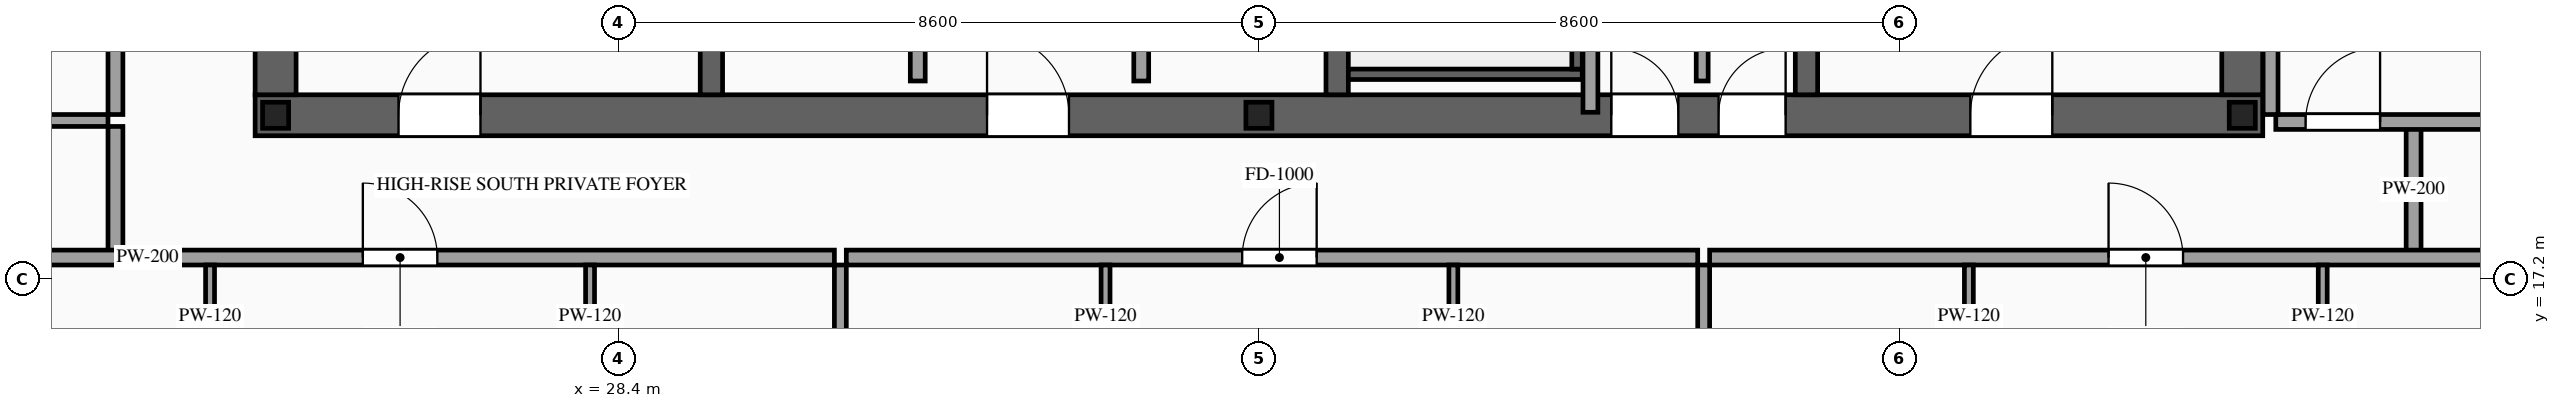
"""IFC4 building model, lengths in metres.
Left out: names, types, materials, properties, quantities, classifications, styles, units other than length and angle.
Written with IfcOpenShell. Run it as: python <this file> out.ifc"""

import sys

from ifc_helpers import new_model, si_unit, direction, frame, frame_2d, origin, origin_2d, place, context, subcontext, project, spatial, rectangle, i_section, extrude, source, transform, mapped, element, fill, save


model = new_model("IFC4")
c1 = context("Model", 3, precision=1e-05, world=origin(), true_north=direction((0.0, 1.0)))
c2 = subcontext(c1, "Body", "Model", "MODEL_VIEW")
j1 = project(units=[si_unit("LENGTHUNIT", "METRE"), si_unit("PLANEANGLEUNIT", "RADIAN")], contexts=[c1])
p1 = place(None, origin())
s1 = spatial("IfcSite", under=j1, at=p1, CompositionType="ELEMENT")
p2 = place(p1, origin())
s2 = spatial("IfcBuilding", under=s1, at=p2, CompositionType="ELEMENT")
p3 = place(p2, frame((0.0, 0.0, 268.1)))
s3 = spatial("IfcBuildingStorey", under=s2, at=p3, CompositionType="ELEMENT", Elevation=268.1)
p4 = place(p3, frame((23.525, 19.4, 0.0), z_axis=(0.0, 0.0, 1.0), x_axis=(1.0, 0.0, 0.0)))
e1 = element("IfcWall", 1, at=p4, inside=s3, PredefinedType="SHEAR", context=c2, shape_type="SweptSolid", body=[
    extrude(rectangle(XDim=26.95, YDim=0.55, at=frame_2d((13.475, 0.0))), origin(), (0.0, 0.0, 1.0), 3.5),
])
p5 = place(p4, frame((1.925, 0.0, 0.0)))
e2 = element("IfcOpeningElement", 2, at=p5, cuts=e1, PredefinedType="OPENING", context=c2, shape_type="SweptSolid", body=[
    extrude(rectangle(XDim=1.1, YDim=2.2, at=frame_2d((0.55, 1.1))), frame((0.0, 0.29, 0.0), z_axis=(0.0, -1.0, 0.0), x_axis=(1.0, 0.0, 0.0)), (0.0, 0.0, 1.0), 0.58),
])
p6 = place(p4, frame((9.825, 0.0, 0.0)))
e3 = element("IfcOpeningElement", 3, at=p6, cuts=e1, PredefinedType="OPENING", context=c2, shape_type="SweptSolid", body=[
    extrude(rectangle(XDim=1.1, YDim=2.2, at=frame_2d((0.55, 1.1))), frame((0.0, 0.29, 0.0), z_axis=(0.0, -1.0, 0.0), x_axis=(1.0, 0.0, 0.0)), (0.0, 0.0, 1.0), 0.58),
])
p7 = place(p4, frame((23.025, 0.0, 0.0)))
e4 = element("IfcOpeningElement", 4, at=p7, cuts=e1, PredefinedType="OPENING", context=c2, shape_type="SweptSolid", body=[
    extrude(rectangle(XDim=1.1, YDim=2.2, at=frame_2d((0.55, 1.1))), frame((0.0, 0.29, 0.0), z_axis=(0.0, -1.0, 0.0), x_axis=(1.0, 0.0, 0.0)), (0.0, 0.0, 1.0), 0.58),
])
p8 = place(p4, frame((19.645, 0.0, 0.0)))
e5 = element("IfcOpeningElement", 5, at=p8, cuts=e1, PredefinedType="OPENING", context=c2, shape_type="SweptSolid", body=[
    extrude(rectangle(XDim=0.9, YDim=2.15, at=frame_2d((0.45, 1.075))), frame((0.0, 0.29, 0.0), z_axis=(0.0, -1.0, 0.0), x_axis=(1.0, 0.0, 0.0)), (0.0, 0.0, 1.0), 0.58),
])
p9 = place(p4, frame((18.205, 0.0, 0.0)))
e6 = element("IfcOpeningElement", 6, at=p9, cuts=e1, PredefinedType="OPENING", context=c2, shape_type="SweptSolid", body=[
    extrude(rectangle(XDim=0.9, YDim=2.15, at=frame_2d((0.45, 1.075))), frame((0.0, 0.29, 0.0), z_axis=(0.0, -1.0, 0.0), x_axis=(1.0, 0.0, 0.0)), (0.0, 0.0, 1.0), 0.58),
])
m1 = source(origin(), c2, "Body", "SweptSolid", [
    extrude(rectangle(XDim=12.25, YDim=0.55, at=frame_2d((6.125, 0.0))), origin(), (0.0, 0.0, 1.0), 3.5),
])
for number, where, z_axis, x_axis in (
    (7, (23.8, 19.675, 0.0), (0.0, 0.0, 1.0), (0.0, 1.0, 0.0)),
    (8, (50.2, 19.675, 0.0), (0.0, 0.0, 1.0), (0.0, 1.0, 0.0)),
):
    element("IfcWall", number, at=place(p3, frame(where, z_axis=z_axis, x_axis=x_axis)), inside=s3, PredefinedType="SHEAR", context=c2, shape_type="MappedRepresentation", body=[
        mapped(m1, transform((0.0, 0.0, 0.0), scale=1.0)),
    ])
m2 = source(origin(), c2, "Body", "SweptSolid", [
    extrude(rectangle(XDim=12.25, YDim=0.3, at=frame_2d((6.125, 0.0))), origin(), (0.0, 0.0, 1.0), 3.5),
])
for number, where, z_axis, x_axis in (
    (9, (29.65, 19.675, 0.0), (0.0, 0.0, 1.0), (0.0, 1.0, 0.0)),
    (10, (38.05, 19.675, 0.0), (0.0, 0.0, 1.0), (0.0, 1.0, 0.0)),
):
    element("IfcWall", number, at=place(p3, frame(where, z_axis=z_axis, x_axis=x_axis)), inside=s3, PredefinedType="SOLIDWALL", context=c2, shape_type="MappedRepresentation", body=[
        mapped(m2, transform((0.0, 0.0, 0.0), scale=1.0)),
    ])
p10 = place(p3, frame((44.35, 19.675, 0.0), z_axis=(0.0, 0.0, 1.0), x_axis=(0.0, 1.0, 0.0)))
e11 = element("IfcWall", 11, at=p10, inside=s3, PredefinedType="SOLIDWALL", context=c2, shape_type="SweptSolid", body=[
    extrude(rectangle(XDim=12.25, YDim=0.3, at=frame_2d((6.125, 0.0))), origin(), (0.0, 0.0, 1.0), 3.5),
])
p11 = place(p10, frame((6.525, 0.0, 0.0)))
e12 = element("IfcOpeningElement", 12, at=p11, cuts=e11, PredefinedType="OPENING", context=c2, shape_type="SweptSolid", body=[
    extrude(rectangle(XDim=1.1, YDim=2.2, at=frame_2d((0.55, 1.1))), frame((0.0, 0.165, 0.0), z_axis=(0.0, -1.0, 0.0), x_axis=(1.0, 0.0, 0.0)), (0.0, 0.0, 1.0), 0.33),
])
p12 = place(p10, frame((8.625, 0.0, 0.0)))
e13 = element("IfcOpeningElement", 13, at=p12, cuts=e11, PredefinedType="OPENING", context=c2, shape_type="SweptSolid", body=[
    extrude(rectangle(XDim=1.1, YDim=2.2, at=frame_2d((0.55, 1.1))), frame((0.0, 0.165, 0.0), z_axis=(0.0, -1.0, 0.0), x_axis=(1.0, 0.0, 0.0)), (0.0, 0.0, 1.0), 0.33),
])
p13 = place(p10, frame((10.725, 0.0, 0.0)))
e14 = element("IfcOpeningElement", 14, at=p13, cuts=e11, PredefinedType="OPENING", context=c2, shape_type="SweptSolid", body=[
    extrude(rectangle(XDim=1.1, YDim=2.2, at=frame_2d((0.55, 1.1))), frame((0.0, 0.165, 0.0), z_axis=(0.0, -1.0, 0.0), x_axis=(1.0, 0.0, 0.0)), (0.0, 0.0, 1.0), 0.33),
])
m3 = source(origin(), c2, "Body", "SweptSolid", [
    extrude(i_section(OverallWidth=0.35, OverallDepth=0.35, WebThickness=0.012, FlangeThickness=0.019, at=origin_2d()), origin(), (0.0, 0.0, 1.0), 3.5),
])
for number, where, z_axis, x_axis in (
    (15, (23.8, 19.4, 0.0), (0.0, 0.0, 1.0), (1.0, 0.0, 0.0)),
    (16, (37.0, 19.4, 0.0), (0.0, 0.0, 1.0), (1.0, 0.0, 0.0)),
    (17, (50.2, 19.4, 0.0), (0.0, 0.0, 1.0), (1.0, 0.0, 0.0)),
):
    element("IfcColumn", number, at=place(p3, frame(where, z_axis=z_axis, x_axis=x_axis)), inside=s3, PredefinedType="COLUMN", context=c2, shape_type="MappedRepresentation", body=[
        mapped(m3, transform((0.0, 0.0, 0.0), scale=1.0)),
    ])
m4 = source(origin(), c2, "Body", "SweptSolid", [
    extrude(rectangle(XDim=3.14, YDim=0.14, at=frame_2d((1.57, 0.0))), origin(), (0.0, 0.0, 1.0), 3.28),
])
p14 = place(p3, frame((38.2, 19.95, 0.0), z_axis=(0.0, 0.0, 1.0), x_axis=(1.0, 0.0, 0.0)))
e18 = element("IfcWall", 18, at=p14, inside=s3, PredefinedType="SOLIDWALL", context=c2, shape_type="MappedRepresentation", body=[
    mapped(m4, transform((0.0, 0.0, 0.0), scale=1.0)),
])
m5 = source(origin(), c2, "Body", "SweptSolid", [
    extrude(rectangle(XDim=8.94, YDim=0.14, at=frame_2d((4.47, 0.0))), origin(), (0.0, 0.0, 1.0), 3.28),
])
p15 = place(p3, frame((41.27, 20.02, 0.0), z_axis=(0.0, 0.0, 1.0), x_axis=(0.0, 1.0, 0.0)))
e19 = element("IfcWall", 19, at=p15, inside=s3, PredefinedType="SOLIDWALL", context=c2, shape_type="MappedRepresentation", body=[
    mapped(m5, transform((0.0, 0.0, 0.0), scale=1.0)),
])
p16 = place(p3, frame((32.42, 19.86, 0.0), z_axis=(0.0, 0.0, 1.0), x_axis=(0.0, 1.0, 0.0)))
e20 = element("IfcWall", 20, at=p16, inside=s3, PredefinedType="PARTITIONING", context=c2, shape_type="SweptSolid", body=[
    extrude(rectangle(XDim=7.94, YDim=0.2, at=frame_2d((3.97, 0.0))), origin(), (0.0, 0.0, 1.0), 3.28),
])
p17 = place(p16, frame((3.52, 0.0, 0.0)))
e21 = element("IfcOpeningElement", 21, at=p17, cuts=e20, PredefinedType="OPENING", context=c2, shape_type="SweptSolid", body=[
    extrude(rectangle(XDim=0.9, YDim=2.15, at=frame_2d((0.45, 1.075))), frame((0.0, 0.115, 0.0), z_axis=(0.0, -1.0, 0.0), x_axis=(1.0, 0.0, 0.0)), (0.0, 0.0, 1.0), 0.23),
])
p18 = place(p3, frame((35.42, 19.86, 0.0), z_axis=(0.0, 0.0, 1.0), x_axis=(0.0, 1.0, 0.0)))
e22 = element("IfcWall", 22, at=p18, inside=s3, PredefinedType="PARTITIONING", context=c2, shape_type="SweptSolid", body=[
    extrude(rectangle(XDim=6.34, YDim=0.2, at=frame_2d((3.17, 0.0))), origin(), (0.0, 0.0, 1.0), 3.28),
])
p19 = place(p18, frame((2.72, 0.0, 0.0)))
e23 = element("IfcOpeningElement", 23, at=p19, cuts=e22, PredefinedType="OPENING", context=c2, shape_type="SweptSolid", body=[
    extrude(rectangle(XDim=0.9, YDim=2.15, at=frame_2d((0.45, 1.075))), frame((0.0, 0.115, 0.0), z_axis=(0.0, -1.0, 0.0), x_axis=(1.0, 0.0, 0.0)), (0.0, 0.0, 1.0), 0.23),
])
m6 = source(origin(), c2, "Body", "SweptSolid", [
    extrude(rectangle(XDim=1.34, YDim=0.16, at=frame_2d((0.67, 0.0))), origin(), (0.0, 0.0, 1.0), 3.28),
])
p20 = place(p3, frame((42.95, 19.86, 0.0), z_axis=(0.0, 0.0, 1.0), x_axis=(0.0, 1.0, 0.0)))
e24 = element("IfcWall", 24, at=p20, inside=s3, PredefinedType="PARTITIONING", context=c2, shape_type="MappedRepresentation", body=[
    mapped(m6, transform((0.0, 0.0, 0.0), scale=1.0)),
])
m7 = source(origin(), c2, "Body", "SweptSolid", [
    extrude(rectangle(XDim=6.06, YDim=0.2, at=frame_2d((3.03, 0.0))), origin(), (0.0, 0.0, 1.0), 3.28),
])
p21 = place(p3, frame((41.45, 19.44, 0.0), z_axis=(0.0, 0.0, 1.0), x_axis=(0.0, 1.0, 0.0)))
e25 = element("IfcWall", 25, at=p21, inside=s3, PredefinedType="PARTITIONING", context=c2, shape_type="MappedRepresentation", body=[
    mapped(m7, transform((0.0, 0.0, 0.0), scale=1.0)),
])
m8 = source(origin(), c2, "Body", "SweptSolid", [
    extrude(rectangle(XDim=1.7, YDim=0.2, at=frame_2d((0.85, 0.0))), origin(), (0.0, 0.0, 1.0), 3.28),
])
for number, where, z_axis, x_axis in (
    (26, (21.65, 17.55, 0.0), (0.0, 0.0, 1.0), (0.0, 1.0, 0.0)),
    (27, (52.5, 17.55, 0.0), (0.0, 0.0, 1.0), (0.0, 1.0, 0.0)),
):
    element("IfcWall", number, at=place(p3, frame(where, z_axis=z_axis, x_axis=x_axis)), inside=s3, PredefinedType="PARTITIONING", context=c2, shape_type="MappedRepresentation", body=[
        mapped(m8, transform((0.0, 0.0, 0.0), scale=1.0)),
    ])
p22 = place(p3, frame((19.44, 17.49, 0.0), z_axis=(0.0, 0.0, 1.0), x_axis=(1.0, 0.0, 0.0)))
e28 = element("IfcWall", 28, at=p22, inside=s3, PredefinedType="PARTITIONING", context=c2, shape_type="SweptSolid", body=[
    extrude(rectangle(XDim=11.861, YDim=0.2, at=frame_2d((5.931, 0.0))), origin(), (0.0, 0.0, 1.0), 3.28),
])
p23 = place(p22, frame((5.531, 0.0, 0.0)))
e29 = element("IfcOpeningElement", 29, at=p23, cuts=e28, PredefinedType="OPENING", context=c2, shape_type="SweptSolid", body=[
    extrude(rectangle(XDim=1.0, YDim=2.2, at=frame_2d((0.5, 1.1))), frame((0.0, 0.115, 0.0), z_axis=(0.0, -1.0, 0.0), x_axis=(1.0, 0.0, 0.0)), (0.0, 0.0, 1.0), 0.23),
])
m9 = source(origin(), c2, "Body", "SweptSolid", [
    extrude(rectangle(XDim=12.04, YDim=0.16, at=frame_2d((6.02, 0.0))), origin(), (0.0, 0.0, 1.0), 3.28),
])
p24 = place(p3, frame((31.381, 5.35, 0.0), z_axis=(0.0, 0.0, 1.0), x_axis=(0.0, 1.0, 0.0)))
e30 = element("IfcWall", 30, at=p24, inside=s3, PredefinedType="PARTITIONING", context=c2, shape_type="MappedRepresentation", body=[
    mapped(m9, transform((0.0, 0.0, 0.0), scale=1.0)),
])
p25 = place(p3, frame((22.92, 13.28, 0.0), z_axis=(0.0, 0.0, 1.0), x_axis=(0.0, 1.0, 0.0)))
e31 = element("IfcWall", 31, at=p25, inside=s3, PredefinedType="PARTITIONING", context=c2, shape_type="SweptSolid", body=[
    extrude(rectangle(XDim=4.11, YDim=0.12, at=frame_2d((2.055, 0.0))), origin(), (0.0, 0.0, 1.0), 3.28),
])
p26 = place(p25, frame((1.63, 0.0, 0.0)))
e32 = element("IfcOpeningElement", 32, at=p26, cuts=e31, PredefinedType="OPENING", context=c2, shape_type="SweptSolid", body=[
    extrude(rectangle(XDim=0.85, YDim=2.1, at=frame_2d((0.425, 1.05))), frame((0.0, 0.075, 0.0), z_axis=(0.0, -1.0, 0.0), x_axis=(1.0, 0.0, 0.0)), (0.0, 0.0, 1.0), 0.15),
])
p27 = place(p3, frame((28.021, 13.28, 0.0), z_axis=(0.0, 0.0, 1.0), x_axis=(0.0, 1.0, 0.0)))
e33 = element("IfcWall", 33, at=p27, inside=s3, PredefinedType="PARTITIONING", context=c2, shape_type="SweptSolid", body=[
    extrude(rectangle(XDim=4.11, YDim=0.12, at=frame_2d((2.055, 0.0))), origin(), (0.0, 0.0, 1.0), 3.28),
])
p28 = place(p27, frame((1.63, 0.0, 0.0)))
e34 = element("IfcOpeningElement", 34, at=p28, cuts=e33, PredefinedType="OPENING", context=c2, shape_type="SweptSolid", body=[
    extrude(rectangle(XDim=0.85, YDim=2.1, at=frame_2d((0.425, 1.05))), frame((0.0, 0.075, 0.0), z_axis=(0.0, -1.0, 0.0), x_axis=(1.0, 0.0, 0.0)), (0.0, 0.0, 1.0), 0.15),
])
p29 = place(p3, frame((31.461, 17.49, 0.0), z_axis=(0.0, 0.0, 1.0), x_axis=(1.0, 0.0, 0.0)))
e35 = element("IfcWall", 35, at=p29, inside=s3, PredefinedType="PARTITIONING", context=c2, shape_type="SweptSolid", body=[
    extrude(rectangle(XDim=11.429, YDim=0.2, at=frame_2d((5.714, 0.0))), origin(), (0.0, 0.0, 1.0), 3.28),
])
p30 = place(p29, frame((5.314, 0.0, 0.0)))
e36 = element("IfcOpeningElement", 36, at=p30, cuts=e35, PredefinedType="OPENING", context=c2, shape_type="SweptSolid", body=[
    extrude(rectangle(XDim=1.0, YDim=2.2, at=frame_2d((0.5, 1.1))), frame((0.0, 0.115, 0.0), z_axis=(0.0, -1.0, 0.0), x_axis=(1.0, 0.0, 0.0)), (0.0, 0.0, 1.0), 0.23),
])
p31 = place(p3, frame((42.97, 5.35, 0.0), z_axis=(0.0, 0.0, 1.0), x_axis=(0.0, 1.0, 0.0)))
e37 = element("IfcWall", 37, at=p31, inside=s3, PredefinedType="PARTITIONING", context=c2, shape_type="MappedRepresentation", body=[
    mapped(m9, transform((0.0, 0.0, 0.0), scale=1.0)),
])
p32 = place(p3, frame((34.941, 13.28, 0.0), z_axis=(0.0, 0.0, 1.0), x_axis=(0.0, 1.0, 0.0)))
e38 = element("IfcWall", 38, at=p32, inside=s3, PredefinedType="PARTITIONING", context=c2, shape_type="SweptSolid", body=[
    extrude(rectangle(XDim=4.11, YDim=0.12, at=frame_2d((2.055, 0.0))), origin(), (0.0, 0.0, 1.0), 3.28),
])
p33 = place(p32, frame((1.63, 0.0, 0.0)))
e39 = element("IfcOpeningElement", 39, at=p33, cuts=e38, PredefinedType="OPENING", context=c2, shape_type="SweptSolid", body=[
    extrude(rectangle(XDim=0.85, YDim=2.1, at=frame_2d((0.425, 1.05))), frame((0.0, 0.075, 0.0), z_axis=(0.0, -1.0, 0.0), x_axis=(1.0, 0.0, 0.0)), (0.0, 0.0, 1.0), 0.15),
])
p34 = place(p3, frame((39.61, 13.28, 0.0), z_axis=(0.0, 0.0, 1.0), x_axis=(0.0, 1.0, 0.0)))
e40 = element("IfcWall", 40, at=p34, inside=s3, PredefinedType="PARTITIONING", context=c2, shape_type="SweptSolid", body=[
    extrude(rectangle(XDim=4.11, YDim=0.12, at=frame_2d((2.055, 0.0))), origin(), (0.0, 0.0, 1.0), 3.28),
])
p35 = place(p34, frame((1.63, 0.0, 0.0)))
e41 = element("IfcOpeningElement", 41, at=p35, cuts=e40, PredefinedType="OPENING", context=c2, shape_type="SweptSolid", body=[
    extrude(rectangle(XDim=0.85, YDim=2.1, at=frame_2d((0.425, 1.05))), frame((0.0, 0.075, 0.0), z_axis=(0.0, -1.0, 0.0), x_axis=(1.0, 0.0, 0.0)), (0.0, 0.0, 1.0), 0.15),
])
p36 = place(p3, frame((43.05, 17.49, 0.0), z_axis=(0.0, 0.0, 1.0), x_axis=(1.0, 0.0, 0.0)))
e42 = element("IfcWall", 42, at=p36, inside=s3, PredefinedType="PARTITIONING", context=c2, shape_type="SweptSolid", body=[
    extrude(rectangle(XDim=11.51, YDim=0.2, at=frame_2d((5.755, 0.0))), origin(), (0.0, 0.0, 1.0), 3.28),
])
p37 = place(p36, frame((5.355, 0.0, 0.0)))
e43 = element("IfcOpeningElement", 43, at=p37, cuts=e42, PredefinedType="OPENING", context=c2, shape_type="SweptSolid", body=[
    extrude(rectangle(XDim=1.0, YDim=2.2, at=frame_2d((0.5, 1.1))), frame((0.0, 0.115, 0.0), z_axis=(0.0, -1.0, 0.0), x_axis=(1.0, 0.0, 0.0)), (0.0, 0.0, 1.0), 0.23),
])
p38 = place(p3, frame((46.53, 13.28, 0.0), z_axis=(0.0, 0.0, 1.0), x_axis=(0.0, 1.0, 0.0)))
e44 = element("IfcWall", 44, at=p38, inside=s3, PredefinedType="PARTITIONING", context=c2, shape_type="SweptSolid", body=[
    extrude(rectangle(XDim=4.11, YDim=0.12, at=frame_2d((2.055, 0.0))), origin(), (0.0, 0.0, 1.0), 3.28),
])
p39 = place(p38, frame((1.63, 0.0, 0.0)))
e45 = element("IfcOpeningElement", 45, at=p39, cuts=e44, PredefinedType="OPENING", context=c2, shape_type="SweptSolid", body=[
    extrude(rectangle(XDim=0.85, YDim=2.1, at=frame_2d((0.425, 1.05))), frame((0.0, 0.075, 0.0), z_axis=(0.0, -1.0, 0.0), x_axis=(1.0, 0.0, 0.0)), (0.0, 0.0, 1.0), 0.15),
])
p40 = place(p3, frame((51.28, 13.28, 0.0), z_axis=(0.0, 0.0, 1.0), x_axis=(0.0, 1.0, 0.0)))
e46 = element("IfcWall", 46, at=p40, inside=s3, PredefinedType="PARTITIONING", context=c2, shape_type="SweptSolid", body=[
    extrude(rectangle(XDim=4.11, YDim=0.12, at=frame_2d((2.055, 0.0))), origin(), (0.0, 0.0, 1.0), 3.28),
])
p41 = place(p40, frame((1.63, 0.0, 0.0)))
e47 = element("IfcOpeningElement", 47, at=p41, cuts=e46, PredefinedType="OPENING", context=c2, shape_type="SweptSolid", body=[
    extrude(rectangle(XDim=0.85, YDim=2.1, at=frame_2d((0.425, 1.05))), frame((0.0, 0.075, 0.0), z_axis=(0.0, -1.0, 0.0), x_axis=(1.0, 0.0, 0.0)), (0.0, 0.0, 1.0), 0.15),
])
p42 = place(p3, frame((21.65, 19.41, 0.0), z_axis=(0.0, 0.0, 1.0), x_axis=(0.0, 1.0, 0.0)))
e48 = element("IfcWall", 48, at=p42, inside=s3, PredefinedType="PARTITIONING", context=c2, shape_type="SweptSolid", body=[
    extrude(rectangle(XDim=12.78, YDim=0.2, at=frame_2d((6.39, 0.0))), origin(), (0.0, 0.0, 1.0), 3.28),
])
p43 = place(p42, frame((5.89, 0.0, 0.0)))
e49 = element("IfcOpeningElement", 49, at=p43, cuts=e48, PredefinedType="OPENING", context=c2, shape_type="SweptSolid", body=[
    extrude(rectangle(XDim=1.0, YDim=2.2, at=frame_2d((0.5, 1.1))), frame((0.0, 0.115, 0.0), z_axis=(0.0, -1.0, 0.0), x_axis=(1.0, 0.0, 0.0)), (0.0, 0.0, 1.0), 0.23),
])
m10 = source(origin(), c2, "Body", "SweptSolid", [
    extrude(rectangle(XDim=5.0, YDim=0.16, at=frame_2d((2.5, 0.0))), origin(), (0.0, 0.0, 1.0), 2.825),
])
p44 = place(p3, frame((16.55, 19.33, 0.0), z_axis=(0.0, 0.0, 1.0), x_axis=(1.0, 0.0, 0.0)))
e50 = element("IfcWall", 50, at=p44, inside=s3, PredefinedType="PARTITIONING", context=c2, shape_type="MappedRepresentation", body=[
    mapped(m10, transform((0.0, 0.0, 0.0), scale=1.0)),
])
p45 = place(p3, frame((50.65, 19.31, 0.0), z_axis=(0.0, 0.0, 1.0), x_axis=(1.0, 0.0, 0.0)))
e51 = element("IfcWall", 51, at=p45, inside=s3, PredefinedType="PARTITIONING", context=c2, shape_type="SweptSolid", body=[
    extrude(rectangle(XDim=6.8, YDim=0.2, at=frame_2d((3.4, 0.0))), origin(), (0.0, 0.0, 1.0), 2.825),
])
p46 = place(p45, frame((0.4, 0.0, 0.0)))
e52 = element("IfcOpeningElement", 52, at=p46, cuts=e51, PredefinedType="OPENING", context=c2, shape_type="SweptSolid", body=[
    extrude(rectangle(XDim=1.0, YDim=2.2, at=frame_2d((0.5, 1.1))), frame((0.0, 0.115, 0.0), z_axis=(0.0, -1.0, 0.0), x_axis=(1.0, 0.0, 0.0)), (0.0, 0.0, 1.0), 0.23),
])
m11 = source(origin(), c2, "Body", "SweptSolid", [
    extrude(rectangle(XDim=12.78, YDim=0.2, at=frame_2d((6.39, 0.0))), origin(), (0.0, 0.0, 1.0), 3.28),
])
p47 = place(p3, frame((50.58, 19.41, 0.0), z_axis=(0.0, 0.0, 1.0), x_axis=(0.0, 1.0, 0.0)))
e53 = element("IfcWall", 53, at=p47, inside=s3, PredefinedType="PARTITIONING", context=c2, shape_type="MappedRepresentation", body=[
    mapped(m11, transform((0.0, 0.0, 0.0), scale=1.0)),
])
m12 = source(origin(), c2, "Body", "SweptSolid", [
    extrude(rectangle(XDim=1.1, YDim=2.2, at=frame_2d((0.55, 1.1))), frame((0.0, 0.025, 0.0), z_axis=(0.0, -1.0, 0.0), x_axis=(1.0, 0.0, 0.0)), (0.0, 0.0, 1.0), 0.05),
])
p48 = place(p5, origin())
e54 = element("IfcDoor", 54, at=p48, inside=s3, OperationType="SINGLE_SWING_RIGHT", PredefinedType="DOOR", context=c2, shape_type="MappedRepresentation", body=[
    mapped(m12, transform((0.0, 0.0, 0.0), scale=1.0)),
])
fill(e2, e54)
p49 = place(p6, origin())
e55 = element("IfcDoor", 55, at=p49, inside=s3, OperationType="SINGLE_SWING_LEFT", PredefinedType="DOOR", context=c2, shape_type="MappedRepresentation", body=[
    mapped(m12, transform((0.0, 0.0, 0.0), scale=1.0)),
])
fill(e3, e55)
p50 = place(p7, origin())
e56 = element("IfcDoor", 56, at=p50, inside=s3, OperationType="SINGLE_SWING_RIGHT", PredefinedType="DOOR", context=c2, shape_type="MappedRepresentation", body=[
    mapped(m12, transform((0.0, 0.0, 0.0), scale=1.0)),
])
fill(e4, e56)
m13 = source(origin(), c2, "Body", "SweptSolid", [
    extrude(rectangle(XDim=0.9, YDim=2.15, at=frame_2d((0.45, 1.075))), frame((0.0, 0.025, 0.0), z_axis=(0.0, -1.0, 0.0), x_axis=(1.0, 0.0, 0.0)), (0.0, 0.0, 1.0), 0.05),
])
p51 = place(p8, origin())
e57 = element("IfcDoor", 57, at=p51, inside=s3, OperationType="SINGLE_SWING_RIGHT", PredefinedType="DOOR", context=c2, shape_type="MappedRepresentation", body=[
    mapped(m13, transform((0.0, 0.0, 0.0), scale=1.0)),
])
fill(e5, e57)
p52 = place(p9, origin())
e58 = element("IfcDoor", 58, at=p52, inside=s3, OperationType="SINGLE_SWING_LEFT", PredefinedType="DOOR", context=c2, shape_type="MappedRepresentation", body=[
    mapped(m13, transform((0.0, 0.0, 0.0), scale=1.0)),
])
fill(e6, e58)
m14 = source(origin(), c2, "Body", "SweptSolid", [
    extrude(rectangle(XDim=1.0, YDim=2.2, at=frame_2d((0.5, 1.1))), frame((0.0, 0.025, 0.0), z_axis=(0.0, -1.0, 0.0), x_axis=(1.0, 0.0, 0.0)), (0.0, 0.0, 1.0), 0.05),
])
p53 = place(p23, origin())
e59 = element("IfcDoor", 59, at=p53, inside=s3, OperationType="SINGLE_SWING_LEFT", PredefinedType="DOOR", context=c2, shape_type="MappedRepresentation", body=[
    mapped(m14, transform((0.0, 0.0, 0.0), scale=1.0)),
])
fill(e29, e59)
p54 = place(p30, origin())
e60 = element("IfcDoor", 60, at=p54, inside=s3, OperationType="SINGLE_SWING_RIGHT", PredefinedType="DOOR", context=c2, shape_type="MappedRepresentation", body=[
    mapped(m14, transform((0.0, 0.0, 0.0), scale=1.0)),
])
fill(e36, e60)
p55 = place(p37, origin())
e61 = element("IfcDoor", 61, at=p55, inside=s3, OperationType="SINGLE_SWING_LEFT", PredefinedType="DOOR", context=c2, shape_type="MappedRepresentation", body=[
    mapped(m14, transform((0.0, 0.0, 0.0), scale=1.0)),
])
fill(e43, e61)
p56 = place(p46, origin())
e62 = element("IfcDoor", 62, at=p56, inside=s3, OperationType="SINGLE_SWING_RIGHT", PredefinedType="DOOR", context=c2, shape_type="MappedRepresentation", body=[
    mapped(m14, transform((0.0, 0.0, 0.0), scale=1.0)),
])
fill(e52, e62)
save(model, sys.argv[1])
